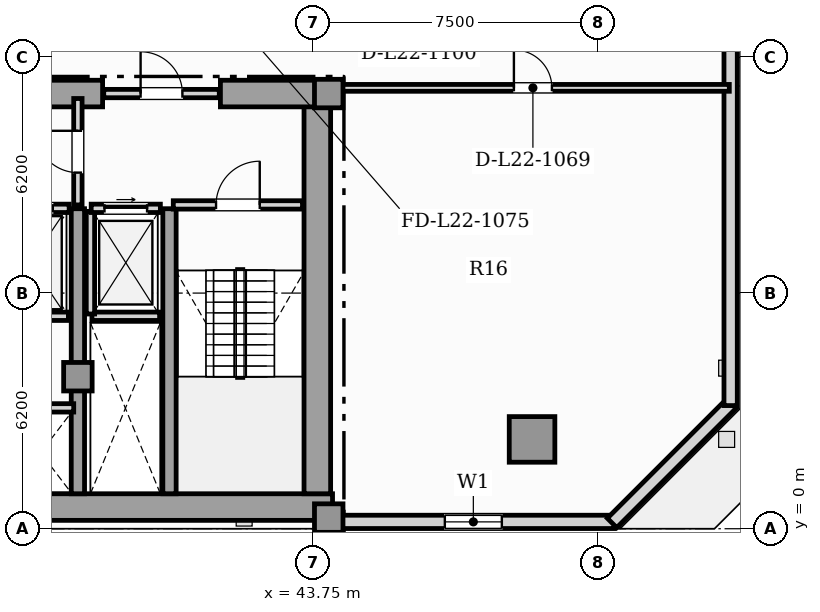
"""IFC4 building model, lengths in metres.
Left out: names, types, materials, properties, quantities, classifications, styles, units other than length and angle.
Written with IfcOpenShell. Run it as: python <this file> out.ifc"""

import sys

from ifc_helpers import new_model, si_unit, direction, frame, frame_2d, origin, origin_2d, place, context, subcontext, project, spatial, rectangle, hollow_rectangle, extrude, element, fill, save


model = new_model("IFC4")
c1 = context("Model", 3, precision=1e-05, world=origin(), true_north=direction((0.0, 1.0)))
c2 = subcontext(c1, "Body", "Model", "MODEL_VIEW")
j1 = project(units=[si_unit("LENGTHUNIT", "METRE"), si_unit("PLANEANGLEUNIT", "RADIAN")], contexts=[c1])
p1 = place(None, origin())
s1 = spatial("IfcSite", under=j1, at=p1, CompositionType="ELEMENT")
p2 = place(p1, origin())
s2 = spatial("IfcBuilding", under=s1, at=p2, CompositionType="ELEMENT")
p3 = place(p2, frame((0.0, 0.0, 92.6)))
s3 = spatial("IfcBuildingStorey", under=s2, at=p3, CompositionType="ELEMENT", Elevation=92.6)
p4 = place(p3, frame((13.25, 0.57, 0.0), z_axis=(0.0, 0.0, 1.0), x_axis=(1.0, 0.0, 0.0)))
e1 = element("IfcWall", 1, at=p4, inside=s3, PredefinedType="SHEAR", context=c2, shape_type="SweptSolid", body=[
    extrude(rectangle(XDim=31.0, YDim=0.7, at=frame_2d((15.5, 0.0))), origin(), (0.0, 0.0, 1.0), 3.6),
])
p5 = place(p3, frame((43.85, 0.92, 0.0), z_axis=(0.0, 0.0, 1.0), x_axis=(0.0, 1.0, 0.0)))
e2 = element("IfcWall", 2, at=p5, inside=s3, PredefinedType="SHEAR", context=c2, shape_type="SweptSolid", body=[
    extrude(rectangle(XDim=10.53, YDim=0.7, at=frame_2d((5.265, 0.0))), origin(), (0.0, 0.0, 1.0), 3.6),
])
p6 = place(p3, frame((30.9, 11.45, 0.0), z_axis=(0.0, 0.0, 1.0), x_axis=(1.0, 0.0, 0.0)))
e3 = element("IfcWall", 3, at=p6, inside=s3, PredefinedType="SHEAR", context=c2, shape_type="SweptSolid", body=[
    extrude(rectangle(XDim=7.3, YDim=0.7, at=frame_2d((3.65, 0.0))), origin(), (0.0, 0.0, 1.0), 3.6),
])
p7 = place(p3, frame((41.3, 11.45, 0.0), z_axis=(0.0, 0.0, 1.0), x_axis=(1.0, 0.0, 0.0)))
e4 = element("IfcWall", 4, at=p7, inside=s3, PredefinedType="SHEAR", context=c2, shape_type="SweptSolid", body=[
    extrude(rectangle(XDim=2.95, YDim=0.7, at=frame_2d((1.475, 0.0))), origin(), (0.0, 0.0, 1.0), 3.6),
])
for number, where, z_axis, x_axis in (
    (5, (37.55, 0.92, 0.0), (0.0, 0.0, 1.0), (0.0, 1.0, 0.0)),
    (6, (39.96, 0.92, 0.0), (0.0, 0.0, 1.0), (0.0, 1.0, 0.0)),
):
    element("IfcWall", number, at=place(p3, frame(where, z_axis=z_axis, x_axis=x_axis)), inside=s3, PredefinedType="SHEAR", context=c2, shape_type="SweptSolid", body=[
        extrude(rectangle(XDim=7.5, YDim=0.35, at=frame_2d((3.75, 0.0))), origin(), (0.0, 0.0, 1.0), 3.6),
    ])
for number, where, z_axis, x_axis in (
    (7, (44.15, 0.28, 0.0), (0.0, 0.0, 1.0), (1.0, 0.0, 0.0)),
    (8, (44.15, 11.45, 0.0), (0.0, 0.0, 1.0), (1.0, 0.0, 0.0)),
    (9, (37.55, 4.0, 0.0), (0.0, 0.0, 1.0), (1.0, 0.0, 0.0)),
):
    element("IfcColumn", number, at=place(p3, frame(where, z_axis=z_axis, x_axis=x_axis)), inside=s3, PredefinedType="COLUMN", context=c2, shape_type="SweptSolid", body=[
        extrude(rectangle(XDim=0.75, YDim=0.75, at=origin_2d()), origin(), (0.0, 0.0, 1.0), 3.85),
    ])
p8 = place(p3, frame((49.5, 2.35, 0.0), z_axis=(0.0, 0.0, 1.0), x_axis=(1.0, 0.0, 0.0)))
e10 = element("IfcColumn", 10, at=p8, inside=s3, PredefinedType="USERDEFINED", context=c2, shape_type="SweptSolid", body=[
    extrude(hollow_rectangle(XDim=1.2, YDim=1.2, WallThickness=0.07, at=origin_2d()), origin(), (0.0, 0.0, 1.0), 3.85),
])
p9 = place(p3, frame((44.25, 0.18, 0.0), z_axis=(0.0, 0.0, 1.0), x_axis=(1.0, 0.0, 0.0)))
e11 = element("IfcWall", 11, at=p9, inside=s3, PredefinedType="SOLIDWALL", context=c2, shape_type="SweptSolid", body=[
    extrude(rectangle(XDim=7.41, YDim=0.35, at=frame_2d((3.705, 0.0))), origin(), (0.0, 0.0, 1.0), 3.6),
])
p10 = place(p9, frame((2.955, 0.0, 0.9)))
e12 = element("IfcOpeningElement", 12, at=p10, cuts=e11, PredefinedType="OPENING", context=c2, shape_type="SweptSolid", body=[
    extrude(rectangle(XDim=1.5, YDim=1.95, at=frame_2d((0.75, 0.975))), frame((0.0, 0.185, 0.0), z_axis=(0.0, -1.0, 0.0), x_axis=(1.0, 0.0, 0.0)), (0.0, 0.0, 1.0), 0.37),
])
p11 = place(p3, frame((51.604, 0.152, 0.0), z_axis=(0.0, 0.0, 1.0), x_axis=(0.707134240044, 0.707079321262, 0.0)))
e13 = element("IfcWall", 13, at=p11, inside=s3, PredefinedType="SOLIDWALL", context=c2, shape_type="SweptSolid", body=[
    extrude(rectangle(XDim=4.446, YDim=0.35, at=frame_2d((2.223, 0.0))), origin(), (0.0, 0.0, 1.0), 3.6),
])
p12 = place(p3, frame((54.725, 3.24, 0.0), z_axis=(0.0, 0.0, 1.0), x_axis=(0.0, 1.0, 0.0)))
e14 = element("IfcWall", 14, at=p12, inside=s3, PredefinedType="SOLIDWALL", context=c2, shape_type="SweptSolid", body=[
    extrude(rectangle(XDim=20.82, YDim=0.35, at=frame_2d((10.41, 0.0))), origin(), (0.0, 0.0, 1.0), 3.6),
])
p13 = place(p12, frame((13.808, 0.0, 0.85)))
e15 = element("IfcOpeningElement", 15, at=p13, cuts=e14, PredefinedType="OPENING", context=c2, shape_type="SweptSolid", body=[
    extrude(rectangle(XDim=2.4, YDim=2.0, at=frame_2d((1.2, 1.0))), frame((0.0, 0.185, 0.0), z_axis=(0.0, -1.0, 0.0), x_axis=(1.0, 0.0, 0.0)), (0.0, 0.0, 1.0), 0.37),
])
p14 = place(p3, frame((37.92, 5.59, 0.0), z_axis=(0.0, 0.0, 1.0), x_axis=(1.0, 0.0, 0.0)))
e16 = element("IfcWall", 16, at=p14, inside=s3, PredefinedType="SOLIDWALL", context=c2, shape_type="SweptSolid", body=[
    extrude(rectangle(XDim=1.78, YDim=0.22, at=frame_2d((0.89, 0.0))), origin(), (0.0, 0.0, 1.0), 3.6),
])
p15 = place(p3, frame((37.88, 5.65, 0.0), z_axis=(0.0, 0.0, 1.0), x_axis=(0.0, 1.0, 0.0)))
e17 = element("IfcWall", 17, at=p15, inside=s3, PredefinedType="SOLIDWALL", context=c2, shape_type="SweptSolid", body=[
    extrude(rectangle(XDim=2.7, YDim=0.22, at=frame_2d((1.35, 0.0))), origin(), (0.0, 0.0, 1.0), 3.6),
])
p16 = place(p3, frame((37.9, 8.43, 0.0), z_axis=(0.0, 0.0, 1.0), x_axis=(1.0, 0.0, 0.0)))
e18 = element("IfcWall", 18, at=p16, inside=s3, PredefinedType="SOLIDWALL", context=c2, shape_type="SweptSolid", body=[
    extrude(rectangle(XDim=1.82, YDim=0.22, at=frame_2d((0.91, 0.0))), origin(), (0.0, 0.0, 1.0), 3.6),
])
p17 = place(p16, frame((0.35, 0.0, 0.0)))
e19 = element("IfcOpeningElement", 19, at=p17, cuts=e18, PredefinedType="OPENING", context=c2, shape_type="SweptSolid", body=[
    extrude(rectangle(XDim=1.12, YDim=2.25, at=frame_2d((0.56, 1.125))), frame((0.0, 0.12, 0.0), z_axis=(0.0, -1.0, 0.0), x_axis=(1.0, 0.0, 0.0)), (0.0, 0.0, 1.0), 0.24),
])
p18 = place(p3, frame((35.3, 5.59, 0.0), z_axis=(0.0, 0.0, 1.0), x_axis=(1.0, 0.0, 0.0)))
e20 = element("IfcWall", 20, at=p18, inside=s3, PredefinedType="SOLIDWALL", context=c2, shape_type="SweptSolid", body=[
    extrude(rectangle(XDim=2.0, YDim=0.22, at=frame_2d((1.0, 0.0))), origin(), (0.0, 0.0, 1.0), 3.6),
])
p19 = place(p3, frame((35.28, 8.43, 0.0), z_axis=(0.0, 0.0, 1.0), x_axis=(1.0, 0.0, 0.0)))
e21 = element("IfcWall", 21, at=p19, inside=s3, PredefinedType="SOLIDWALL", context=c2, shape_type="SweptSolid", body=[
    extrude(rectangle(XDim=2.04, YDim=0.22, at=frame_2d((1.02, 0.0))), origin(), (0.0, 0.0, 1.0), 3.6),
])
p20 = place(p19, frame((0.43, 0.0, 0.0)))
e22 = element("IfcOpeningElement", 22, at=p20, cuts=e21, PredefinedType="OPENING", context=c2, shape_type="SweptSolid", body=[
    extrude(rectangle(XDim=1.18, YDim=2.2, at=frame_2d((0.59, 1.1))), frame((0.0, 0.12, 0.0), z_axis=(0.0, -1.0, 0.0), x_axis=(1.0, 0.0, 0.0)), (0.0, 0.0, 1.0), 0.24),
])
p21 = place(p3, frame((35.7, 3.18, 0.0), z_axis=(0.0, 0.0, 1.0), x_axis=(1.0, 0.0, 0.0)))
e23 = element("IfcWall", 23, at=p21, inside=s3, PredefinedType="SOLIDWALL", context=c2, shape_type="SweptSolid", body=[
    extrude(rectangle(XDim=1.74, YDim=0.22, at=frame_2d((0.87, 0.0))), origin(), (0.0, 0.0, 1.0), 3.6),
])
p22 = place(p3, frame((40.06, 8.52, 0.0), z_axis=(0.0, 0.0, 1.0), x_axis=(1.0, 0.0, 0.0)))
e24 = element("IfcWall", 24, at=p22, inside=s3, PredefinedType="SOLIDWALL", context=c2, shape_type="SweptSolid", body=[
    extrude(rectangle(XDim=3.4, YDim=0.22, at=frame_2d((1.7, 0.0))), origin(), (0.0, 0.0, 1.0), 3.6),
])
p23 = place(p22, frame((1.125, 0.0, 0.0)))
e25 = element("IfcOpeningElement", 25, at=p23, cuts=e24, PredefinedType="OPENING", context=c2, shape_type="SweptSolid", body=[
    extrude(rectangle(XDim=1.15, YDim=2.2, at=frame_2d((0.575, 1.1))), frame((0.0, 0.12, 0.0), z_axis=(0.0, -1.0, 0.0), x_axis=(1.0, 0.0, 0.0)), (0.0, 0.0, 1.0), 0.24),
])
p24 = place(p3, frame((37.55, 8.52, 0.0), z_axis=(0.0, 0.0, 1.0), x_axis=(0.0, 1.0, 0.0)))
e26 = element("IfcWall", 26, at=p24, inside=s3, PredefinedType="SOLIDWALL", context=c2, shape_type="SweptSolid", body=[
    extrude(rectangle(XDim=2.8, YDim=0.22, at=frame_2d((1.4, 0.0))), origin(), (0.0, 0.0, 1.0), 3.055),
])
p25 = place(p24, frame((0.85, 0.0, 0.0)))
e27 = element("IfcOpeningElement", 27, at=p25, cuts=e26, PredefinedType="OPENING", context=c2, shape_type="SweptSolid", body=[
    extrude(rectangle(XDim=1.1, YDim=2.2, at=frame_2d((0.55, 1.1))), frame((0.0, 0.12, 0.0), z_axis=(0.0, -1.0, 0.0), x_axis=(1.0, 0.0, 0.0)), (0.0, 0.0, 1.0), 0.24),
])
p26 = place(p3, frame((38.23, 11.45, 0.0), z_axis=(0.0, 0.0, 1.0), x_axis=(1.0, 0.0, 0.0)))
e28 = element("IfcWall", 28, at=p26, inside=s3, PredefinedType="SOLIDWALL", context=c2, shape_type="SweptSolid", body=[
    extrude(rectangle(XDim=3.04, YDim=0.22, at=frame_2d((1.52, 0.0))), origin(), (0.0, 0.0, 1.0), 3.6),
])
p27 = place(p26, frame((0.97, 0.0, 0.0)))
e29 = element("IfcOpeningElement", 29, at=p27, cuts=e28, PredefinedType="OPENING", context=c2, shape_type="SweptSolid", body=[
    extrude(rectangle(XDim=1.1, YDim=2.2, at=frame_2d((0.55, 1.1))), frame((0.0, 0.12, 0.0), z_axis=(0.0, -1.0, 0.0), x_axis=(1.0, 0.0, 0.0)), (0.0, 0.0, 1.0), 0.24),
])
p28 = place(p3, frame((44.355, 11.6, 0.0), z_axis=(0.0, 0.0, 1.0), x_axis=(1.0, 0.0, 0.0)))
e30 = element("IfcWall", 30, at=p28, inside=s3, PredefinedType="PARTITIONING", context=c2, shape_type="SweptSolid", body=[
    extrude(rectangle(XDim=10.335, YDim=0.18, at=frame_2d((5.167, 0.0))), origin(), (0.0, 0.0, 1.0), 3.6),
])
p29 = place(p28, frame((4.667, 0.0, 0.0)))
e31 = element("IfcOpeningElement", 31, at=p29, cuts=e30, PredefinedType="OPENING", context=c2, shape_type="SweptSolid", body=[
    extrude(rectangle(XDim=1.0, YDim=2.15, at=frame_2d((0.5, 1.075))), frame((0.0, 0.1, 0.0), z_axis=(0.0, -1.0, 0.0), x_axis=(1.0, 0.0, 0.0)), (0.0, 0.0, 1.0), 0.2),
])
p30 = place(p10, origin())
e32 = element("IfcWindow", 32, at=p30, inside=s3, PartitioningType="SINGLE_PANEL", PredefinedType="WINDOW", context=c2, shape_type="SweptSolid", body=[
    extrude(rectangle(XDim=1.5, YDim=1.95, at=frame_2d((0.75, 0.975))), frame((0.0, 0.03, 0.0), z_axis=(0.0, -1.0, 0.0), x_axis=(1.0, 0.0, 0.0)), (0.0, 0.0, 1.0), 0.06),
])
fill(e12, e32)
p31 = place(p17, origin())
e33 = element("IfcDoor", 33, at=p31, inside=s3, OperationType="SLIDING_TO_RIGHT", PredefinedType="DOOR", context=c2, shape_type="SweptSolid", body=[
    extrude(rectangle(XDim=1.12, YDim=2.25, at=frame_2d((0.56, 1.125))), frame((0.0, 0.025, 0.0), z_axis=(0.0, -1.0, 0.0), x_axis=(1.0, 0.0, 0.0)), (0.0, 0.0, 1.0), 0.05),
])
fill(e19, e33)
p32 = place(p20, origin())
e34 = element("IfcDoor", 34, at=p32, inside=s3, OperationType="SLIDING_TO_LEFT", PredefinedType="DOOR", context=c2, shape_type="SweptSolid", body=[
    extrude(rectangle(XDim=1.18, YDim=2.2, at=frame_2d((0.59, 1.1))), frame((0.0, 0.025, 0.0), z_axis=(0.0, -1.0, 0.0), x_axis=(1.0, 0.0, 0.0)), (0.0, 0.0, 1.0), 0.05),
])
fill(e22, e34)
p33 = place(p23, origin())
e35 = element("IfcDoor", 35, at=p33, inside=s3, OperationType="SINGLE_SWING_RIGHT", PredefinedType="DOOR", context=c2, shape_type="SweptSolid", body=[
    extrude(rectangle(XDim=1.15, YDim=2.2, at=frame_2d((0.575, 1.1))), frame((0.0, 0.025, 0.0), z_axis=(0.0, -1.0, 0.0), x_axis=(1.0, 0.0, 0.0)), (0.0, 0.0, 1.0), 0.05),
])
fill(e25, e35)
p34 = place(p25, origin())
e36 = element("IfcDoor", 36, at=p34, inside=s3, OperationType="SINGLE_SWING_RIGHT", PredefinedType="DOOR", context=c2, shape_type="SweptSolid", body=[
    extrude(rectangle(XDim=1.1, YDim=2.2, at=frame_2d((0.55, 1.1))), frame((0.0, 0.025, 0.0), z_axis=(0.0, -1.0, 0.0), x_axis=(1.0, 0.0, 0.0)), (0.0, 0.0, 1.0), 0.05),
])
fill(e27, e36)
p35 = place(p27, origin())
e37 = element("IfcDoor", 37, at=p35, inside=s3, OperationType="SINGLE_SWING_LEFT", PredefinedType="DOOR", context=c2, shape_type="SweptSolid", body=[
    extrude(rectangle(XDim=1.1, YDim=2.2, at=frame_2d((0.55, 1.1))), frame((0.0, 0.025, 0.0), z_axis=(0.0, -1.0, 0.0), x_axis=(1.0, 0.0, 0.0)), (0.0, 0.0, 1.0), 0.05),
])
fill(e29, e37)
p36 = place(p29, origin())
e38 = element("IfcDoor", 38, at=p36, inside=s3, OperationType="SINGLE_SWING_LEFT", PredefinedType="DOOR", context=c2, shape_type="SweptSolid", body=[
    extrude(rectangle(XDim=1.0, YDim=2.15, at=frame_2d((0.5, 1.075))), frame((0.0, 0.025, 0.0), z_axis=(0.0, -1.0, 0.0), x_axis=(1.0, 0.0, 0.0)), (0.0, 0.0, 1.0), 0.05),
])
fill(e31, e38)
save(model, sys.argv[1])
